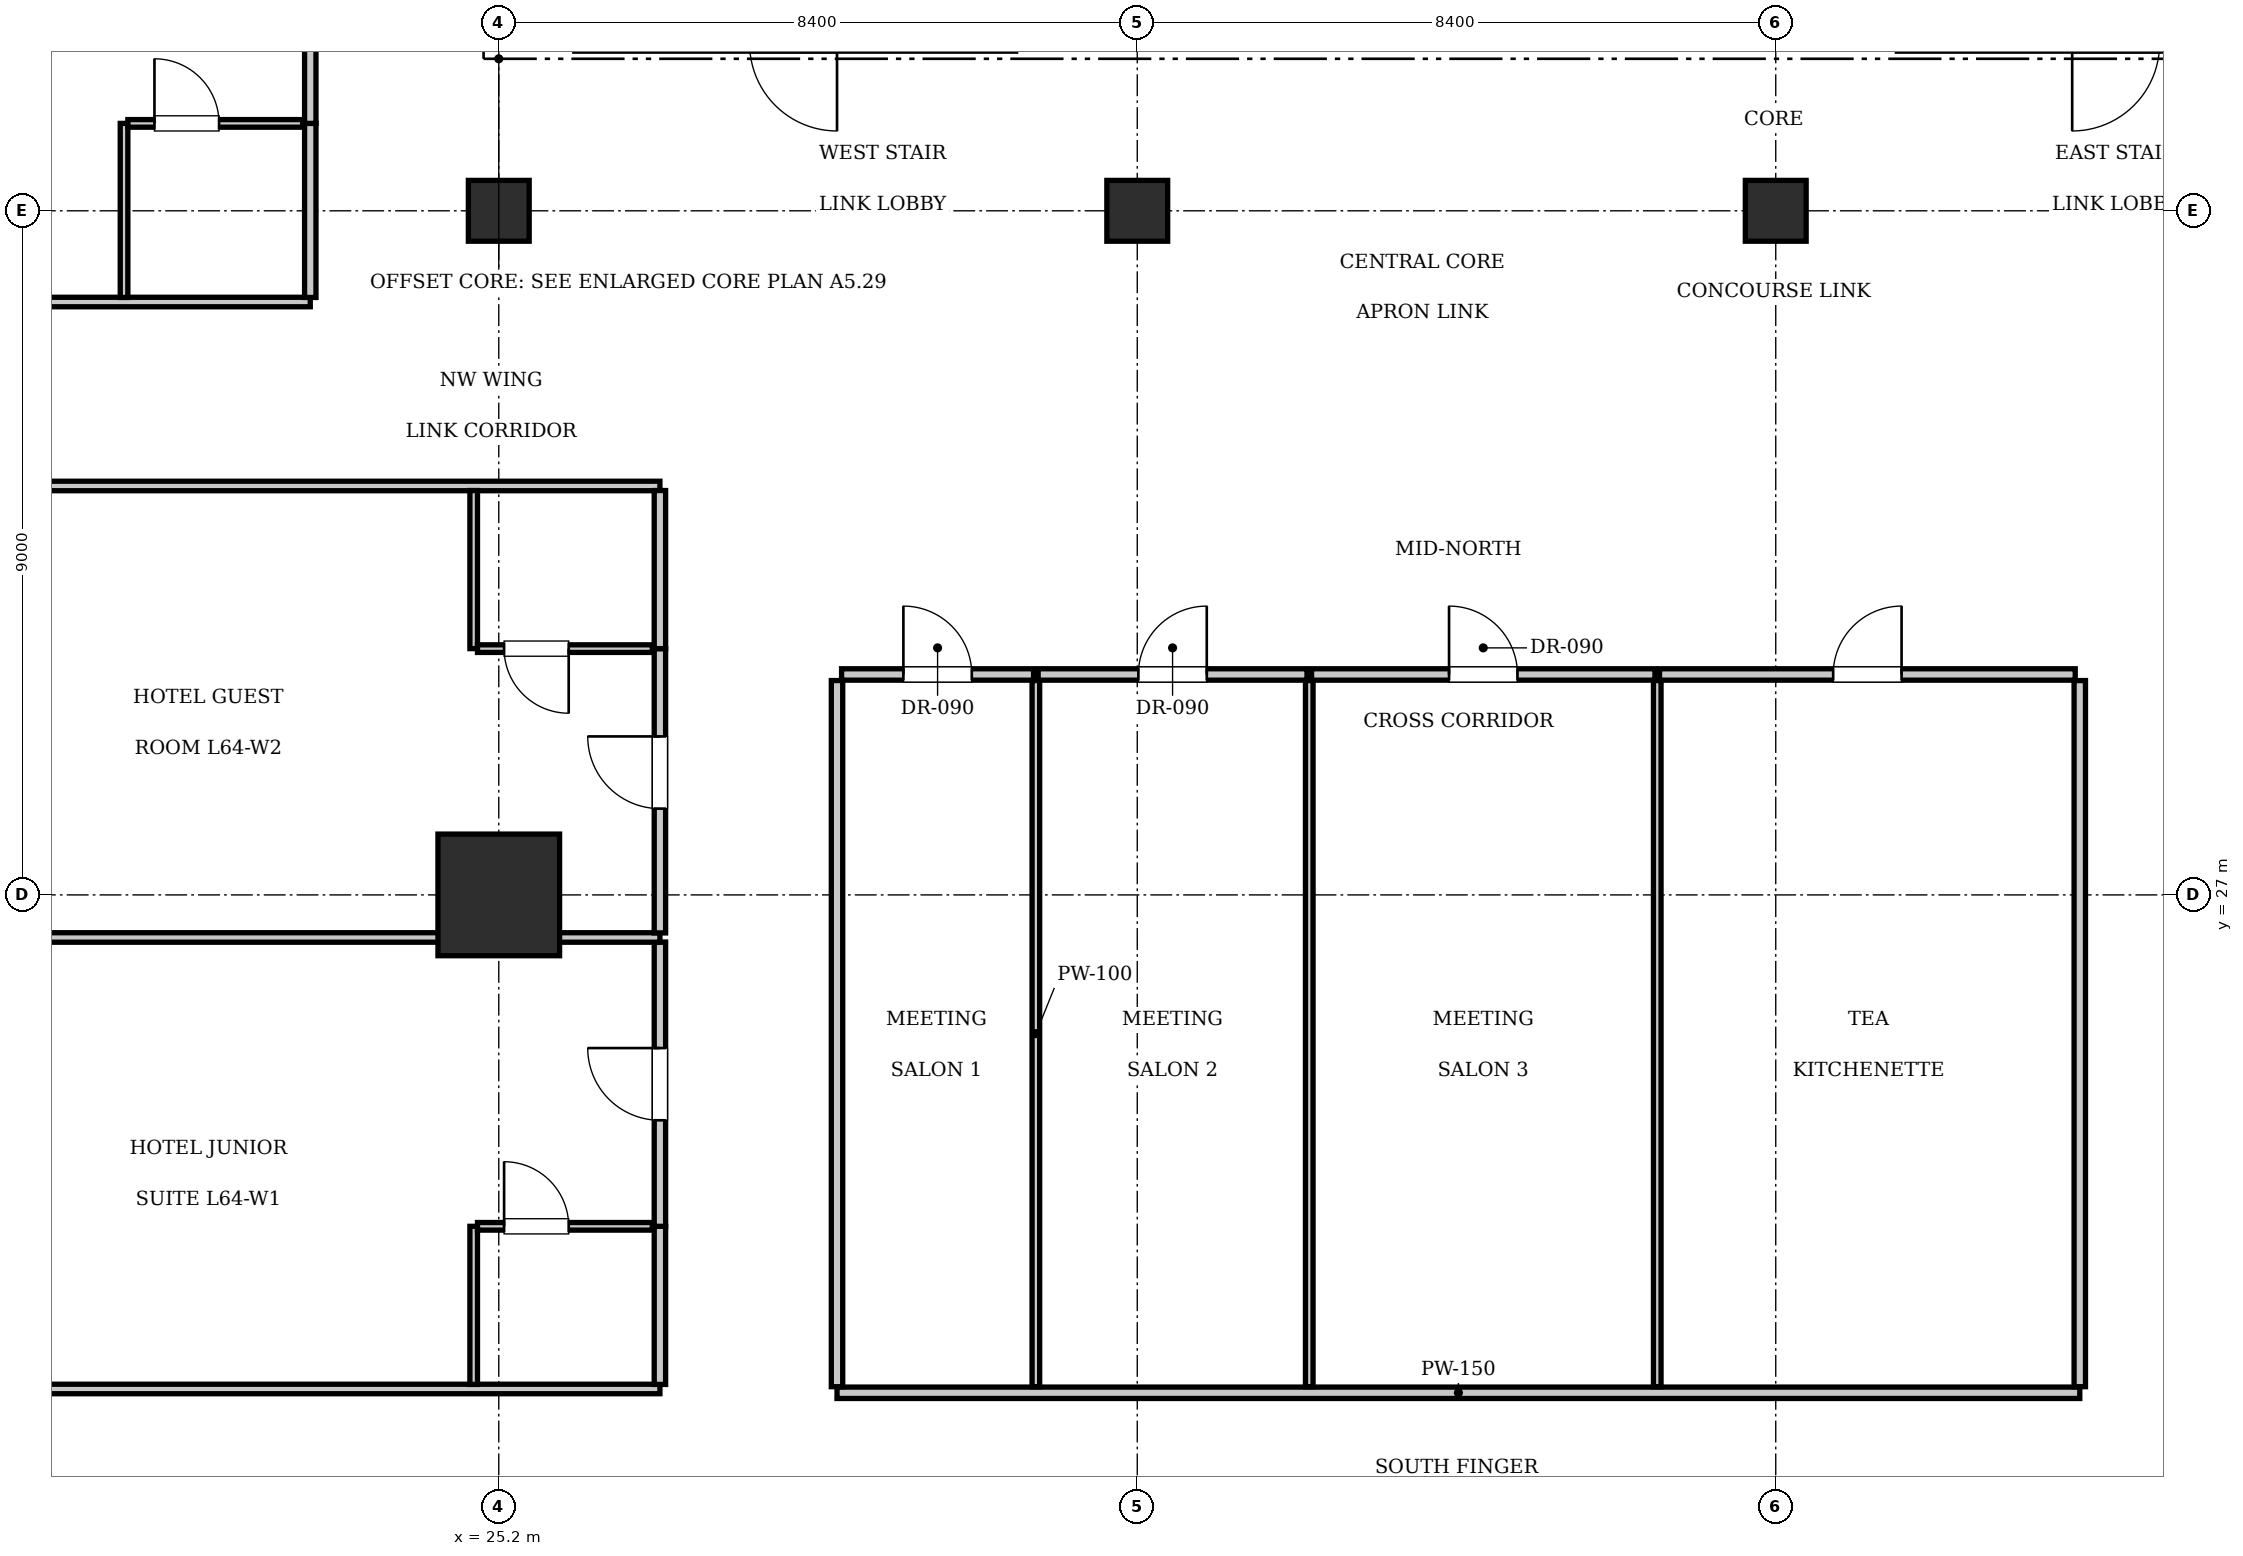
"""IFC4 building model, lengths in metres.
Left out: names, types, materials, properties, quantities, classifications, styles, units other than length and angle.
Written with IfcOpenShell. Run it as: python <this file> out.ifc"""

import sys

from ifc_helpers import new_model, si_unit, direction, frame, frame_2d, origin, origin_2d, place, context, subcontext, project, spatial, rectangle, extrude, element, fill, save


model = new_model("IFC4")
c1 = context("Model", 3, precision=1e-05, world=origin(), true_north=direction((0.0, 1.0)))
c2 = subcontext(c1, "Body", "Model", "MODEL_VIEW")
j1 = project(units=[si_unit("LENGTHUNIT", "METRE"), si_unit("PLANEANGLEUNIT", "RADIAN")], contexts=[c1])
p1 = place(None, origin())
s1 = spatial("IfcSite", under=j1, at=p1, CompositionType="ELEMENT")
p2 = place(p1, origin())
s2 = spatial("IfcBuilding", under=s1, at=p2, CompositionType="ELEMENT")
p3 = place(p2, frame((0.0, 0.0, 262.5)))
s3 = spatial("IfcBuildingStorey", under=s2, at=p3, CompositionType="ELEMENT", Elevation=262.5)
p4 = place(p3, frame((25.2, 27.0, 0.0), z_axis=(0.0, 0.0, 1.0), x_axis=(1.0, 0.0, 0.0)))
e1 = element("IfcColumn", 1, at=p4, inside=s3, PredefinedType="COLUMN", context=c2, shape_type="SweptSolid", body=[
    extrude(rectangle(XDim=1.6, YDim=1.6, at=origin_2d()), origin(), (0.0, 0.0, 1.0), 3.85),
])
for number, where, z_axis, x_axis in (
    (2, (25.2, 36.0, 0.0), (0.0, 0.0, 1.0), (1.0, 0.0, 0.0)),
    (3, (33.6, 36.0, 0.0), (0.0, 0.0, 1.0), (1.0, 0.0, 0.0)),
    (4, (42.0, 36.0, 0.0), (0.0, 0.0, 1.0), (1.0, 0.0, 0.0)),
):
    element("IfcColumn", number, at=place(p3, frame(where, z_axis=z_axis, x_axis=x_axis)), inside=s3, PredefinedType="COLUMN", context=c2, shape_type="SweptSolid", body=[
        extrude(rectangle(XDim=0.8, YDim=0.8, at=origin_2d()), origin(), (0.0, 0.0, 1.0), 3.85),
    ])
p5 = place(p3, frame((29.65, 20.45, 0.0), z_axis=(0.0, 0.0, 1.0), x_axis=(1.0, 0.0, 0.0)))
e5 = element("IfcWall", 5, at=p5, inside=s3, PredefinedType="PARTITIONING", context=c2, shape_type="SweptSolid", body=[
    extrude(rectangle(XDim=16.35, YDim=0.15, at=frame_2d((8.175, 0.0))), origin(), (0.0, 0.0, 1.0), 3.61),
])
for number, where, z_axis, x_axis in (
    (6, (29.65, 20.53, 0.0), (0.0, 0.0, 1.0), (0.0, 1.0, 0.0)),
    (7, (46.0, 20.53, 0.0), (0.0, 0.0, 1.0), (0.0, 1.0, 0.0)),
):
    element("IfcWall", number, at=place(p3, frame(where, z_axis=z_axis, x_axis=x_axis)), inside=s3, PredefinedType="PARTITIONING", context=c2, shape_type="SweptSolid", body=[
        extrude(rectangle(XDim=9.29, YDim=0.15, at=frame_2d((4.645, 0.0))), origin(), (0.0, 0.0, 1.0), 3.61),
    ])
p6 = place(p3, frame((29.71, 29.9, 0.0), z_axis=(0.0, 0.0, 1.0), x_axis=(1.0, 0.0, 0.0)))
e8 = element("IfcWall", 8, at=p6, inside=s3, PredefinedType="PARTITIONING", context=c2, shape_type="SweptSolid", body=[
    extrude(rectangle(XDim=2.526, YDim=0.15, at=frame_2d((1.263, 0.0))), origin(), (0.0, 0.0, 1.0), 3.61),
])
p7 = place(p6, frame((0.813, 0.0, 0.0)))
e9 = element("IfcOpeningElement", 9, at=p7, cuts=e8, PredefinedType="OPENING", context=c2, shape_type="SweptSolid", body=[
    extrude(rectangle(XDim=0.9, YDim=2.1, at=frame_2d((0.45, 1.05))), frame((0.0, 0.085, 0.0), z_axis=(0.0, -1.0, 0.0), x_axis=(1.0, 0.0, 0.0)), (0.0, 0.0, 1.0), 0.17),
])
p8 = place(p3, frame((32.266, 20.53, 0.0), z_axis=(0.0, 0.0, 1.0), x_axis=(0.0, 1.0, 0.0)))
e10 = element("IfcWall", 10, at=p8, inside=s3, PredefinedType="PARTITIONING", context=c2, shape_type="SweptSolid", body=[
    extrude(rectangle(XDim=9.29, YDim=0.1, at=frame_2d((4.645, 0.0))), origin(), (0.0, 0.0, 1.0), 3.61),
])
p9 = place(p3, frame((32.296, 29.9, 0.0), z_axis=(0.0, 0.0, 1.0), x_axis=(1.0, 0.0, 0.0)))
e11 = element("IfcWall", 11, at=p9, inside=s3, PredefinedType="PARTITIONING", context=c2, shape_type="SweptSolid", body=[
    extrude(rectangle(XDim=3.537, YDim=0.15, at=frame_2d((1.769, 0.0))), origin(), (0.0, 0.0, 1.0), 3.61),
])
p10 = place(p9, frame((1.319, 0.0, 0.0)))
e12 = element("IfcOpeningElement", 12, at=p10, cuts=e11, PredefinedType="OPENING", context=c2, shape_type="SweptSolid", body=[
    extrude(rectangle(XDim=0.9, YDim=2.1, at=frame_2d((0.45, 1.05))), frame((0.0, 0.085, 0.0), z_axis=(0.0, -1.0, 0.0), x_axis=(1.0, 0.0, 0.0)), (0.0, 0.0, 1.0), 0.17),
])
p11 = place(p3, frame((35.863, 20.53, 0.0), z_axis=(0.0, 0.0, 1.0), x_axis=(0.0, 1.0, 0.0)))
e13 = element("IfcWall", 13, at=p11, inside=s3, PredefinedType="PARTITIONING", context=c2, shape_type="SweptSolid", body=[
    extrude(rectangle(XDim=9.29, YDim=0.1, at=frame_2d((4.645, 0.0))), origin(), (0.0, 0.0, 1.0), 3.61),
])
p12 = place(p3, frame((35.893, 29.9, 0.0), z_axis=(0.0, 0.0, 1.0), x_axis=(1.0, 0.0, 0.0)))
e14 = element("IfcWall", 14, at=p12, inside=s3, PredefinedType="PARTITIONING", context=c2, shape_type="SweptSolid", body=[
    extrude(rectangle(XDim=4.518, YDim=0.15, at=frame_2d((2.259, 0.0))), origin(), (0.0, 0.0, 1.0), 3.61),
])
p13 = place(p12, frame((1.809, 0.0, 0.0)))
e15 = element("IfcOpeningElement", 15, at=p13, cuts=e14, PredefinedType="OPENING", context=c2, shape_type="SweptSolid", body=[
    extrude(rectangle(XDim=0.9, YDim=2.1, at=frame_2d((0.45, 1.05))), frame((0.0, 0.085, 0.0), z_axis=(0.0, -1.0, 0.0), x_axis=(1.0, 0.0, 0.0)), (0.0, 0.0, 1.0), 0.17),
])
p14 = place(p3, frame((40.441, 20.53, 0.0), z_axis=(0.0, 0.0, 1.0), x_axis=(0.0, 1.0, 0.0)))
e16 = element("IfcWall", 16, at=p14, inside=s3, PredefinedType="PARTITIONING", context=c2, shape_type="SweptSolid", body=[
    extrude(rectangle(XDim=9.29, YDim=0.1, at=frame_2d((4.645, 0.0))), origin(), (0.0, 0.0, 1.0), 3.61),
])
p15 = place(p3, frame((40.471, 29.9, 0.0), z_axis=(0.0, 0.0, 1.0), x_axis=(1.0, 0.0, 0.0)))
e17 = element("IfcWall", 17, at=p15, inside=s3, PredefinedType="PARTITIONING", context=c2, shape_type="SweptSolid", body=[
    extrude(rectangle(XDim=5.469, YDim=0.15, at=frame_2d((2.734, 0.0))), origin(), (0.0, 0.0, 1.0), 3.61),
])
p16 = place(p15, frame((2.284, 0.0, 0.0)))
e18 = element("IfcOpeningElement", 18, at=p16, cuts=e17, PredefinedType="OPENING", context=c2, shape_type="SweptSolid", body=[
    extrude(rectangle(XDim=0.9, YDim=2.1, at=frame_2d((0.45, 1.05))), frame((0.0, 0.085, 0.0), z_axis=(0.0, -1.0, 0.0), x_axis=(1.0, 0.0, 0.0)), (0.0, 0.0, 1.0), 0.17),
])
for number, where, z_axis, x_axis in (
    (19, (15.5, 20.5, 0.0), (0.0, 0.0, 1.0), (1.0, 0.0, 0.0)),
    (20, (15.5, 32.38, 0.0), (0.0, 0.0, 1.0), (1.0, 0.0, 0.0)),
):
    element("IfcWall", number, at=place(p3, frame(where, z_axis=z_axis, x_axis=x_axis)), inside=s3, PredefinedType="PARTITIONING", context=c2, shape_type="SweptSolid", body=[
        extrude(rectangle(XDim=11.82, YDim=0.125, at=frame_2d((5.91, 0.0))), origin(), (0.0, 0.0, 1.0), 3.61),
    ])
p17 = place(p3, frame((27.32, 20.56, 0.0), z_axis=(0.0, 0.0, 1.0), x_axis=(0.0, 1.0, 0.0)))
e21 = element("IfcWall", 21, at=p17, inside=s3, PredefinedType="PARTITIONING", context=c2, shape_type="SweptSolid", body=[
    extrude(rectangle(XDim=2.08, YDim=0.15, at=frame_2d((1.04, 0.0))), origin(), (0.0, 0.0, 1.0), 3.61),
])
p18 = place(p3, frame((27.32, 22.64, 0.0), z_axis=(0.0, 0.0, 1.0), x_axis=(0.0, 1.0, 0.0)))
e22 = element("IfcWall", 22, at=p18, inside=s3, PredefinedType="PARTITIONING", context=c2, shape_type="SweptSolid", body=[
    extrude(rectangle(XDim=3.74, YDim=0.15, at=frame_2d((1.87, 0.0))), origin(), (0.0, 0.0, 1.0), 3.61),
])
p19 = place(p18, frame((1.395, 0.0, 0.0)))
e23 = element("IfcOpeningElement", 23, at=p19, cuts=e22, PredefinedType="OPENING", context=c2, shape_type="SweptSolid", body=[
    extrude(rectangle(XDim=0.95, YDim=2.15, at=frame_2d((0.475, 1.075))), frame((0.0, 0.085, 0.0), z_axis=(0.0, -1.0, 0.0), x_axis=(1.0, 0.0, 0.0)), (0.0, 0.0, 1.0), 0.17),
])
p20 = place(p3, frame((24.87, 20.56, 0.0), z_axis=(0.0, 0.0, 1.0), x_axis=(0.0, 1.0, 0.0)))
e24 = element("IfcWall", 24, at=p20, inside=s3, PredefinedType="PARTITIONING", context=c2, shape_type="SweptSolid", body=[
    extrude(rectangle(XDim=2.08, YDim=0.1, at=frame_2d((1.04, 0.0))), origin(), (0.0, 0.0, 1.0), 3.61),
])
p21 = place(p3, frame((24.92, 22.64, 0.0), z_axis=(0.0, 0.0, 1.0), x_axis=(1.0, 0.0, 0.0)))
e25 = element("IfcWall", 25, at=p21, inside=s3, PredefinedType="PARTITIONING", context=c2, shape_type="SweptSolid", body=[
    extrude(rectangle(XDim=2.3, YDim=0.1, at=frame_2d((1.15, 0.0))), origin(), (0.0, 0.0, 1.0), 3.61),
])
p22 = place(p21, frame((0.35, 0.0, 0.0)))
e26 = element("IfcOpeningElement", 26, at=p22, cuts=e25, PredefinedType="OPENING", context=c2, shape_type="SweptSolid", body=[
    extrude(rectangle(XDim=0.85, YDim=2.1, at=frame_2d((0.425, 1.05))), frame((0.0, 0.06, 0.0), z_axis=(0.0, -1.0, 0.0), x_axis=(1.0, 0.0, 0.0)), (0.0, 0.0, 1.0), 0.12),
])
p23 = place(p3, frame((15.5, 26.44, 0.0), z_axis=(0.0, 0.0, 1.0), x_axis=(1.0, 0.0, 0.0)))
e27 = element("IfcWall", 27, at=p23, inside=s3, PredefinedType="PARTITIONING", context=c2, shape_type="SweptSolid", body=[
    extrude(rectangle(XDim=11.82, YDim=0.125, at=frame_2d((5.91, 0.0))), origin(), (0.0, 0.0, 1.0), 3.61),
])
p24 = place(p3, frame((27.32, 26.5, 0.0), z_axis=(0.0, 0.0, 1.0), x_axis=(0.0, 1.0, 0.0)))
e28 = element("IfcWall", 28, at=p24, inside=s3, PredefinedType="PARTITIONING", context=c2, shape_type="SweptSolid", body=[
    extrude(rectangle(XDim=3.74, YDim=0.15, at=frame_2d((1.87, 0.0))), origin(), (0.0, 0.0, 1.0), 3.61),
])
p25 = place(p24, frame((1.635, 0.0, 0.0)))
e29 = element("IfcOpeningElement", 29, at=p25, cuts=e28, PredefinedType="OPENING", context=c2, shape_type="SweptSolid", body=[
    extrude(rectangle(XDim=0.95, YDim=2.15, at=frame_2d((0.475, 1.075))), frame((0.0, 0.085, 0.0), z_axis=(0.0, -1.0, 0.0), x_axis=(1.0, 0.0, 0.0)), (0.0, 0.0, 1.0), 0.17),
])
p26 = place(p3, frame((27.32, 30.24, 0.0), z_axis=(0.0, 0.0, 1.0), x_axis=(0.0, 1.0, 0.0)))
e30 = element("IfcWall", 30, at=p26, inside=s3, PredefinedType="PARTITIONING", context=c2, shape_type="SweptSolid", body=[
    extrude(rectangle(XDim=2.08, YDim=0.15, at=frame_2d((1.04, 0.0))), origin(), (0.0, 0.0, 1.0), 3.61),
])
p27 = place(p3, frame((24.87, 30.24, 0.0), z_axis=(0.0, 0.0, 1.0), x_axis=(0.0, 1.0, 0.0)))
e31 = element("IfcWall", 31, at=p27, inside=s3, PredefinedType="PARTITIONING", context=c2, shape_type="SweptSolid", body=[
    extrude(rectangle(XDim=2.08, YDim=0.1, at=frame_2d((1.04, 0.0))), origin(), (0.0, 0.0, 1.0), 3.61),
])
p28 = place(p3, frame((24.92, 30.24, 0.0), z_axis=(0.0, 0.0, 1.0), x_axis=(1.0, 0.0, 0.0)))
e32 = element("IfcWall", 32, at=p28, inside=s3, PredefinedType="PARTITIONING", context=c2, shape_type="SweptSolid", body=[
    extrude(rectangle(XDim=2.3, YDim=0.1, at=frame_2d((1.15, 0.0))), origin(), (0.0, 0.0, 1.0), 3.61),
])
p29 = place(p28, frame((0.35, 0.0, 0.0)))
e33 = element("IfcOpeningElement", 33, at=p29, cuts=e32, PredefinedType="OPENING", context=c2, shape_type="SweptSolid", body=[
    extrude(rectangle(XDim=0.85, YDim=2.1, at=frame_2d((0.425, 1.05))), frame((0.0, 0.06, 0.0), z_axis=(0.0, -1.0, 0.0), x_axis=(1.0, 0.0, 0.0)), (0.0, 0.0, 1.0), 0.12),
])
p30 = place(p3, frame((15.5, 34.8, 0.0), z_axis=(0.0, 0.0, 1.0), x_axis=(1.0, 0.0, 0.0)))
e34 = element("IfcWall", 34, at=p30, inside=s3, PredefinedType="PARTITIONING", context=c2, shape_type="SweptSolid", body=[
    extrude(rectangle(XDim=7.22, YDim=0.125, at=frame_2d((3.61, 0.0))), origin(), (0.0, 0.0, 1.0), 3.61),
])
p31 = place(p3, frame((22.72, 34.86, 0.0), z_axis=(0.0, 0.0, 1.0), x_axis=(0.0, 1.0, 0.0)))
e35 = element("IfcWall", 35, at=p31, inside=s3, PredefinedType="PARTITIONING", context=c2, shape_type="SweptSolid", body=[
    extrude(rectangle(XDim=2.29, YDim=0.15, at=frame_2d((1.145, 0.0))), origin(), (0.0, 0.0, 1.0), 3.61),
])
p32 = place(p3, frame((22.72, 37.15, 0.0), z_axis=(0.0, 0.0, 1.0), x_axis=(0.0, 1.0, 0.0)))
e36 = element("IfcWall", 36, at=p32, inside=s3, PredefinedType="PARTITIONING", context=c2, shape_type="SweptSolid", body=[
    extrude(rectangle(XDim=4.559, YDim=0.15, at=frame_2d((2.279, 0.0))), origin(), (0.0, 0.0, 1.0), 3.61),
])
p33 = place(p32, frame((1.804, 0.0, 0.0)))
e37 = element("IfcOpeningElement", 37, at=p33, cuts=e36, PredefinedType="OPENING", context=c2, shape_type="SweptSolid", body=[
    extrude(rectangle(XDim=0.95, YDim=2.15, at=frame_2d((0.475, 1.075))), frame((0.0, 0.085, 0.0), z_axis=(0.0, -1.0, 0.0), x_axis=(1.0, 0.0, 0.0)), (0.0, 0.0, 1.0), 0.17),
])
p34 = place(p3, frame((20.27, 34.86, 0.0), z_axis=(0.0, 0.0, 1.0), x_axis=(0.0, 1.0, 0.0)))
e38 = element("IfcWall", 38, at=p34, inside=s3, PredefinedType="PARTITIONING", context=c2, shape_type="SweptSolid", body=[
    extrude(rectangle(XDim=2.29, YDim=0.1, at=frame_2d((1.145, 0.0))), origin(), (0.0, 0.0, 1.0), 3.61),
])
p35 = place(p3, frame((20.32, 37.15, 0.0), z_axis=(0.0, 0.0, 1.0), x_axis=(1.0, 0.0, 0.0)))
e39 = element("IfcWall", 39, at=p35, inside=s3, PredefinedType="PARTITIONING", context=c2, shape_type="SweptSolid", body=[
    extrude(rectangle(XDim=2.3, YDim=0.1, at=frame_2d((1.15, 0.0))), origin(), (0.0, 0.0, 1.0), 3.61),
])
p36 = place(p35, frame((0.35, 0.0, 0.0)))
e40 = element("IfcOpeningElement", 40, at=p36, cuts=e39, PredefinedType="OPENING", context=c2, shape_type="SweptSolid", body=[
    extrude(rectangle(XDim=0.85, YDim=2.1, at=frame_2d((0.425, 1.05))), frame((0.0, 0.06, 0.0), z_axis=(0.0, -1.0, 0.0), x_axis=(1.0, 0.0, 0.0)), (0.0, 0.0, 1.0), 0.12),
])
p37 = place(p7, origin())
e41 = element("IfcDoor", 41, at=p37, inside=s3, OperationType="SINGLE_SWING_LEFT", PredefinedType="DOOR", context=c2, shape_type="SweptSolid", body=[
    extrude(rectangle(XDim=0.9, YDim=2.1, at=frame_2d((0.45, 1.05))), frame((0.0, 0.025, 0.0), z_axis=(0.0, -1.0, 0.0), x_axis=(1.0, 0.0, 0.0)), (0.0, 0.0, 1.0), 0.05),
])
fill(e9, e41)
p38 = place(p10, origin())
e42 = element("IfcDoor", 42, at=p38, inside=s3, OperationType="SINGLE_SWING_RIGHT", PredefinedType="DOOR", context=c2, shape_type="SweptSolid", body=[
    extrude(rectangle(XDim=0.9, YDim=2.1, at=frame_2d((0.45, 1.05))), frame((0.0, 0.025, 0.0), z_axis=(0.0, -1.0, 0.0), x_axis=(1.0, 0.0, 0.0)), (0.0, 0.0, 1.0), 0.05),
])
fill(e12, e42)
p39 = place(p13, origin())
e43 = element("IfcDoor", 43, at=p39, inside=s3, OperationType="SINGLE_SWING_LEFT", PredefinedType="DOOR", context=c2, shape_type="SweptSolid", body=[
    extrude(rectangle(XDim=0.9, YDim=2.1, at=frame_2d((0.45, 1.05))), frame((0.0, 0.025, 0.0), z_axis=(0.0, -1.0, 0.0), x_axis=(1.0, 0.0, 0.0)), (0.0, 0.0, 1.0), 0.05),
])
fill(e15, e43)
p40 = place(p16, origin())
e44 = element("IfcDoor", 44, at=p40, inside=s3, OperationType="SINGLE_SWING_RIGHT", PredefinedType="DOOR", context=c2, shape_type="SweptSolid", body=[
    extrude(rectangle(XDim=0.9, YDim=2.1, at=frame_2d((0.45, 1.05))), frame((0.0, 0.025, 0.0), z_axis=(0.0, -1.0, 0.0), x_axis=(1.0, 0.0, 0.0)), (0.0, 0.0, 1.0), 0.05),
])
fill(e18, e44)
p41 = place(p22, origin())
e45 = element("IfcDoor", 45, at=p41, inside=s3, OperationType="SINGLE_SWING_LEFT", PredefinedType="DOOR", context=c2, shape_type="SweptSolid", body=[
    extrude(rectangle(XDim=0.85, YDim=2.1, at=frame_2d((0.425, 1.05))), frame((0.0, 0.025, 0.0), z_axis=(0.0, -1.0, 0.0), x_axis=(1.0, 0.0, 0.0)), (0.0, 0.0, 1.0), 0.05),
])
fill(e26, e45)
p42 = place(p19, origin())
e46 = element("IfcDoor", 46, at=p42, inside=s3, OperationType="SINGLE_SWING_RIGHT", PredefinedType="DOOR", context=c2, shape_type="SweptSolid", body=[
    extrude(rectangle(XDim=0.95, YDim=2.15, at=frame_2d((0.475, 1.075))), frame((0.0, 0.025, 0.0), z_axis=(0.0, -1.0, 0.0), x_axis=(1.0, 0.0, 0.0)), (0.0, 0.0, 1.0), 0.05),
])
fill(e23, e46)
p43 = place(p29, frame((0.85, 0.0, 0.0), z_axis=(0.0, 0.0, 1.0), x_axis=(-1.0, 0.0, 0.0)))
e47 = element("IfcDoor", 47, at=p43, inside=s3, OperationType="SINGLE_SWING_LEFT", PredefinedType="DOOR", context=c2, shape_type="SweptSolid", body=[
    extrude(rectangle(XDim=0.85, YDim=2.1, at=frame_2d((0.425, 1.05))), frame((0.0, 0.025, 0.0), z_axis=(0.0, -1.0, 0.0), x_axis=(1.0, 0.0, 0.0)), (0.0, 0.0, 1.0), 0.05),
])
fill(e33, e47)
p44 = place(p25, origin())
e48 = element("IfcDoor", 48, at=p44, inside=s3, OperationType="SINGLE_SWING_RIGHT", PredefinedType="DOOR", context=c2, shape_type="SweptSolid", body=[
    extrude(rectangle(XDim=0.95, YDim=2.15, at=frame_2d((0.475, 1.075))), frame((0.0, 0.025, 0.0), z_axis=(0.0, -1.0, 0.0), x_axis=(1.0, 0.0, 0.0)), (0.0, 0.0, 1.0), 0.05),
])
fill(e29, e48)
p45 = place(p36, origin())
e49 = element("IfcDoor", 49, at=p45, inside=s3, OperationType="SINGLE_SWING_LEFT", PredefinedType="DOOR", context=c2, shape_type="SweptSolid", body=[
    extrude(rectangle(XDim=0.85, YDim=2.1, at=frame_2d((0.425, 1.05))), frame((0.0, 0.025, 0.0), z_axis=(0.0, -1.0, 0.0), x_axis=(1.0, 0.0, 0.0)), (0.0, 0.0, 1.0), 0.05),
])
fill(e40, e49)
save(model, sys.argv[1])
